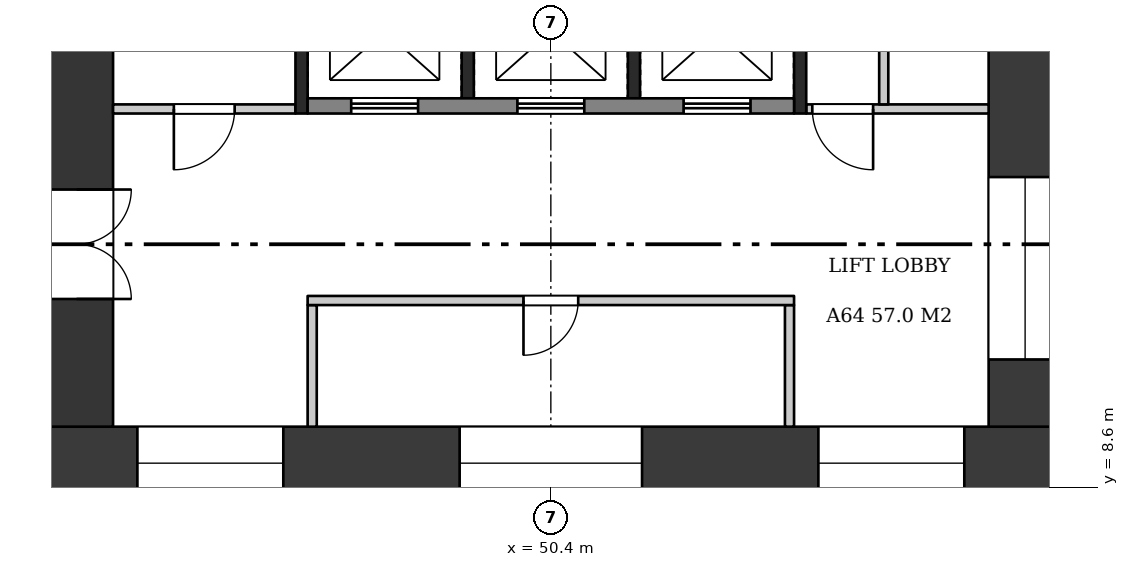
"""IFC4 building model, lengths in metres.
Left out: names, types, materials, properties, quantities, classifications, styles, units other than length and angle.
Written with IfcOpenShell. Run it as: python <this file> out.ifc"""

import sys

from ifc_helpers import new_model, si_unit, direction, frame, frame_2d, origin, place, context, subcontext, project, spatial, rectangle, extrude, element, fill, save


model = new_model("IFC4")
c1 = context("Model", 3, precision=1e-05, world=origin(), true_north=direction((0.0, 1.0)))
c2 = subcontext(c1, "Body", "Model", "MODEL_VIEW")
j1 = project(units=[si_unit("LENGTHUNIT", "METRE"), si_unit("PLANEANGLEUNIT", "RADIAN")], contexts=[c1])
p1 = place(None, origin())
s1 = spatial("IfcSite", under=j1, at=p1, CompositionType="ELEMENT")
p2 = place(p1, origin())
s2 = spatial("IfcBuilding", under=s1, at=p2, CompositionType="ELEMENT")
p3 = place(p2, frame((0.0, 0.0, 245.7)))
s3 = spatial("IfcBuildingStorey", under=s2, at=p3, CompositionType="ELEMENT", Elevation=245.7)
p4 = place(p3, frame((42.0, 9.0, 0.0), z_axis=(0.0, 0.0, 1.0), x_axis=(1.0, 0.0, 0.0)))
e1 = element("IfcWall", 1, at=p4, inside=s3, PredefinedType="SHEAR", context=c2, shape_type="SweptSolid", body=[
    extrude(rectangle(XDim=16.8, YDim=1.2, at=frame_2d((8.4, 0.0))), origin(), (0.0, 0.0, 1.0), 3.22),
])
p5 = place(p4, frame((1.6, 0.0, 0.6)))
e2 = element("IfcOpeningElement", 2, at=p5, cuts=e1, PredefinedType="OPENING", context=c2, shape_type="SweptSolid", body=[
    extrude(rectangle(XDim=2.4, YDim=2.1, at=frame_2d((1.2, 1.05))), frame((0.0, 0.61, 0.0), z_axis=(0.0, -1.0, 0.0), x_axis=(1.0, 0.0, 0.0)), (0.0, 0.0, 1.0), 1.22),
])
p6 = place(p4, frame((6.9, 0.0, 1.6)))
e3 = element("IfcOpeningElement", 3, at=p6, cuts=e1, PredefinedType="OPENING", context=c2, shape_type="SweptSolid", body=[
    extrude(rectangle(XDim=3.0, YDim=1.2, at=frame_2d((1.5, 0.6))), frame((0.0, 0.61, 0.0), z_axis=(0.0, -1.0, 0.0), x_axis=(1.0, 0.0, 0.0)), (0.0, 0.0, 1.0), 1.22),
])
p7 = place(p4, frame((12.8, 0.0, 0.6)))
e4 = element("IfcOpeningElement", 4, at=p7, cuts=e1, PredefinedType="OPENING", context=c2, shape_type="SweptSolid", body=[
    extrude(rectangle(XDim=2.4, YDim=2.1, at=frame_2d((1.2, 1.05))), frame((0.0, 0.61, 0.0), z_axis=(0.0, -1.0, 0.0), x_axis=(1.0, 0.0, 0.0)), (0.0, 0.0, 1.0), 1.22),
])
p8 = place(p3, frame((42.6, 9.6, 0.0), z_axis=(0.0, 0.0, 1.0), x_axis=(0.0, 1.0, 0.0)))
e5 = element("IfcWall", 5, at=p8, inside=s3, PredefinedType="SHEAR", context=c2, shape_type="SweptSolid", body=[
    extrude(rectangle(XDim=14.4, YDim=1.2, at=frame_2d((7.2, 0.0))), origin(), (0.0, 0.0, 1.0), 3.22),
])
p9 = place(p8, frame((2.1, 0.0, 0.0)))
e6 = element("IfcOpeningElement", 6, at=p9, cuts=e5, PredefinedType="OPENING", context=c2, shape_type="SweptSolid", body=[
    extrude(rectangle(XDim=1.8, YDim=2.1, at=frame_2d((0.9, 1.05))), frame((0.0, 0.61, 0.0), z_axis=(0.0, -1.0, 0.0), x_axis=(1.0, 0.0, 0.0)), (0.0, 0.0, 1.0), 1.22),
])
p10 = place(p3, frame((58.2, 9.6, 0.0), z_axis=(0.0, 0.0, 1.0), x_axis=(0.0, 1.0, 0.0)))
e7 = element("IfcWall", 7, at=p10, inside=s3, PredefinedType="SHEAR", context=c2, shape_type="SweptSolid", body=[
    extrude(rectangle(XDim=14.4, YDim=1.2, at=frame_2d((7.2, 0.0))), origin(), (0.0, 0.0, 1.0), 3.22),
])
p11 = place(p10, frame((1.105, 0.0, 0.6)))
e8 = element("IfcOpeningElement", 8, at=p11, cuts=e7, PredefinedType="OPENING", context=c2, shape_type="SweptSolid", body=[
    extrude(rectangle(XDim=3.0, YDim=2.1, at=frame_2d((1.5, 1.05))), frame((0.0, 0.61, 0.0), z_axis=(0.0, -1.0, 0.0), x_axis=(1.0, 0.0, 0.0)), (0.0, 0.0, 1.0), 1.22),
])
p12 = place(p10, frame((8.32, 0.0, 1.6)))
e9 = element("IfcOpeningElement", 9, at=p12, cuts=e7, PredefinedType="OPENING", context=c2, shape_type="SweptSolid", body=[
    extrude(rectangle(XDim=3.0, YDim=1.2, at=frame_2d((1.5, 0.6))), frame((0.0, 0.61, 0.0), z_axis=(0.0, -1.0, 0.0), x_axis=(1.0, 0.0, 0.0)), (0.0, 0.0, 1.0), 1.22),
])
for number, where, z_axis, x_axis in (
    (10, (46.475, 9.6, 0.0), (0.0, 0.0, 1.0), (0.0, 1.0, 0.0)),
    (11, (54.325, 9.6, 0.0), (0.0, 0.0, 1.0), (0.0, 1.0, 0.0)),
):
    element("IfcWall", number, at=place(p3, frame(where, z_axis=z_axis, x_axis=x_axis)), inside=s3, PredefinedType="PARTITIONING", context=c2, shape_type="SweptSolid", body=[
        extrude(rectangle(XDim=2.0, YDim=0.15, at=frame_2d((1.0, 0.0))), origin(), (0.0, 0.0, 1.0), 3.22),
    ])
p13 = place(p3, frame((46.4, 11.675, 0.0), z_axis=(0.0, 0.0, 1.0), x_axis=(1.0, 0.0, 0.0)))
e12 = element("IfcWall", 12, at=p13, inside=s3, PredefinedType="PARTITIONING", context=c2, shape_type="SweptSolid", body=[
    extrude(rectangle(XDim=8.0, YDim=0.15, at=frame_2d((4.0, 0.0))), origin(), (0.0, 0.0, 1.0), 3.22),
])
p14 = place(p13, frame((3.55, 0.0, 0.0)))
e13 = element("IfcOpeningElement", 13, at=p14, cuts=e12, PredefinedType="OPENING", context=c2, shape_type="SweptSolid", body=[
    extrude(rectangle(XDim=0.9, YDim=2.1, at=frame_2d((0.45, 1.05))), frame((0.0, 0.085, 0.0), z_axis=(0.0, -1.0, 0.0), x_axis=(1.0, 0.0, 0.0)), (0.0, 0.0, 1.0), 0.17),
])
for number, where, z_axis, x_axis in (
    (14, (49.033, 15.0, 0.0), (0.0, 0.0, 1.0), (0.0, 1.0, 0.0)),
    (15, (51.767, 15.0, 0.0), (0.0, 0.0, 1.0), (0.0, 1.0, 0.0)),
):
    element("IfcWall", number, at=place(p3, frame(where, z_axis=z_axis, x_axis=x_axis)), inside=s3, PredefinedType="SHEAR", context=c2, shape_type="SweptSolid", body=[
        extrude(rectangle(XDim=1.9, YDim=0.2, at=frame_2d((0.95, 0.0))), origin(), (0.0, 0.0, 1.0), 3.22),
    ])
p15 = place(p3, frame((46.4, 14.875, 0.0), z_axis=(0.0, 0.0, 1.0), x_axis=(1.0, 0.0, 0.0)))
e16 = element("IfcWall", 16, at=p15, inside=s3, PredefinedType="SHEAR", context=c2, shape_type="SweptSolid", body=[
    extrude(rectangle(XDim=8.0, YDim=0.25, at=frame_2d((4.0, 0.0))), origin(), (0.0, 0.0, 1.0), 3.22),
])
p16 = place(p15, frame((0.717, 0.0, 0.0)))
e17 = element("IfcOpeningElement", 17, at=p16, cuts=e16, PredefinedType="OPENING", context=c2, shape_type="SweptSolid", body=[
    extrude(rectangle(XDim=1.1, YDim=2.1, at=frame_2d((0.55, 1.05))), frame((0.0, 0.135, 0.0), z_axis=(0.0, -1.0, 0.0), x_axis=(1.0, 0.0, 0.0)), (0.0, 0.0, 1.0), 0.27),
])
p17 = place(p15, frame((3.45, 0.0, 0.0)))
e18 = element("IfcOpeningElement", 18, at=p17, cuts=e16, PredefinedType="OPENING", context=c2, shape_type="SweptSolid", body=[
    extrude(rectangle(XDim=1.1, YDim=2.1, at=frame_2d((0.55, 1.05))), frame((0.0, 0.135, 0.0), z_axis=(0.0, -1.0, 0.0), x_axis=(1.0, 0.0, 0.0)), (0.0, 0.0, 1.0), 0.27),
])
p18 = place(p15, frame((6.183, 0.0, 0.0)))
e19 = element("IfcOpeningElement", 19, at=p18, cuts=e16, PredefinedType="OPENING", context=c2, shape_type="SweptSolid", body=[
    extrude(rectangle(XDim=1.1, YDim=2.1, at=frame_2d((0.55, 1.05))), frame((0.0, 0.135, 0.0), z_axis=(0.0, -1.0, 0.0), x_axis=(1.0, 0.0, 0.0)), (0.0, 0.0, 1.0), 0.27),
])
p19 = place(p3, frame((46.3, 14.75, 0.0), z_axis=(0.0, 0.0, 1.0), x_axis=(0.0, 1.0, 0.0)))
e20 = element("IfcWall", 20, at=p19, inside=s3, PredefinedType="SHEAR", context=c2, shape_type="SweptSolid", body=[
    extrude(rectangle(XDim=2.4, YDim=0.2, at=frame_2d((1.2, 0.0))), origin(), (0.0, 0.0, 1.0), 3.22),
])
p20 = place(p3, frame((43.2, 14.825, 0.0), z_axis=(0.0, 0.0, 1.0), x_axis=(1.0, 0.0, 0.0)))
e21 = element("IfcWall", 21, at=p20, inside=s3, PredefinedType="PARTITIONING", context=c2, shape_type="SweptSolid", body=[
    extrude(rectangle(XDim=3.0, YDim=0.15, at=frame_2d((1.5, 0.0))), origin(), (0.0, 0.0, 1.0), 3.22),
])
p21 = place(p20, frame((1.0, 0.0, 0.0)))
e22 = element("IfcOpeningElement", 22, at=p21, cuts=e21, PredefinedType="OPENING", context=c2, shape_type="SweptSolid", body=[
    extrude(rectangle(XDim=1.0, YDim=2.1, at=frame_2d((0.5, 1.05))), frame((0.0, 0.085, 0.0), z_axis=(0.0, -1.0, 0.0), x_axis=(1.0, 0.0, 0.0)), (0.0, 0.0, 1.0), 0.17),
])
p22 = place(p3, frame((54.5, 14.75, 0.0), z_axis=(0.0, 0.0, 1.0), x_axis=(0.0, 1.0, 0.0)))
e23 = element("IfcWall", 23, at=p22, inside=s3, PredefinedType="SHEAR", context=c2, shape_type="SweptSolid", body=[
    extrude(rectangle(XDim=9.25, YDim=0.2, at=frame_2d((4.625, 0.0))), origin(), (0.0, 0.0, 1.0), 3.22),
])
p23 = place(p3, frame((54.6, 14.825, 0.0), z_axis=(0.0, 0.0, 1.0), x_axis=(1.0, 0.0, 0.0)))
e24 = element("IfcWall", 24, at=p23, inside=s3, PredefinedType="PARTITIONING", context=c2, shape_type="SweptSolid", body=[
    extrude(rectangle(XDim=3.0, YDim=0.15, at=frame_2d((1.5, 0.0))), origin(), (0.0, 0.0, 1.0), 3.22),
])
p24 = place(p23, frame((0.1, 0.0, 0.0)))
e25 = element("IfcOpeningElement", 25, at=p24, cuts=e24, PredefinedType="OPENING", context=c2, shape_type="SweptSolid", body=[
    extrude(rectangle(XDim=1.0, YDim=2.1, at=frame_2d((0.5, 1.05))), frame((0.0, 0.085, 0.0), z_axis=(0.0, -1.0, 0.0), x_axis=(1.0, 0.0, 0.0)), (0.0, 0.0, 1.0), 0.17),
])
p25 = place(p3, frame((55.875, 14.9, 0.0), z_axis=(0.0, 0.0, 1.0), x_axis=(0.0, 1.0, 0.0)))
e26 = element("IfcWall", 26, at=p25, inside=s3, PredefinedType="PARTITIONING", context=c2, shape_type="SweptSolid", body=[
    extrude(rectangle(XDim=9.1, YDim=0.15, at=frame_2d((4.55, 0.0))), origin(), (0.0, 0.0, 1.0), 3.22),
])
p26 = place(p25, frame((4.1, 0.0, 0.0)))
e27 = element("IfcOpeningElement", 27, at=p26, cuts=e26, PredefinedType="OPENING", context=c2, shape_type="SweptSolid", body=[
    extrude(rectangle(XDim=0.9, YDim=2.1, at=frame_2d((0.45, 1.05))), frame((0.0, 0.085, 0.0), z_axis=(0.0, -1.0, 0.0), x_axis=(1.0, 0.0, 0.0)), (0.0, 0.0, 1.0), 0.17),
])
p27 = place(p9, frame((1.8, 0.0, 0.0), z_axis=(0.0, 0.0, 1.0), x_axis=(-1.0, 0.0, 0.0)))
e28 = element("IfcDoor", 28, at=p27, inside=s3, OperationType="DOUBLE_DOOR_SINGLE_SWING", PredefinedType="DOOR", context=c2, shape_type="SweptSolid", body=[
    extrude(rectangle(XDim=1.8, YDim=2.1, at=frame_2d((0.9, 1.05))), frame((0.0, 0.025, 0.0), z_axis=(0.0, -1.0, 0.0), x_axis=(1.0, 0.0, 0.0)), (0.0, 0.0, 1.0), 0.05),
])
fill(e6, e28)
p28 = place(p14, frame((0.9, 0.0, 0.0), z_axis=(0.0, 0.0, 1.0), x_axis=(-1.0, 0.0, 0.0)))
e29 = element("IfcDoor", 29, at=p28, inside=s3, OperationType="SINGLE_SWING_RIGHT", PredefinedType="DOOR", context=c2, shape_type="SweptSolid", body=[
    extrude(rectangle(XDim=0.9, YDim=2.1, at=frame_2d((0.45, 1.05))), frame((0.0, 0.025, 0.0), z_axis=(0.0, -1.0, 0.0), x_axis=(1.0, 0.0, 0.0)), (0.0, 0.0, 1.0), 0.05),
])
fill(e13, e29)
p29 = place(p16, origin())
e30 = element("IfcDoor", 30, at=p29, inside=s3, OperationType="DOUBLE_DOOR_SLIDING", PredefinedType="DOOR", context=c2, shape_type="SweptSolid", body=[
    extrude(rectangle(XDim=1.1, YDim=2.1, at=frame_2d((0.55, 1.05))), frame((0.0, 0.025, 0.0), z_axis=(0.0, -1.0, 0.0), x_axis=(1.0, 0.0, 0.0)), (0.0, 0.0, 1.0), 0.05),
])
fill(e17, e30)
p30 = place(p17, origin())
e31 = element("IfcDoor", 31, at=p30, inside=s3, OperationType="DOUBLE_DOOR_SLIDING", PredefinedType="DOOR", context=c2, shape_type="SweptSolid", body=[
    extrude(rectangle(XDim=1.1, YDim=2.1, at=frame_2d((0.55, 1.05))), frame((0.0, 0.025, 0.0), z_axis=(0.0, -1.0, 0.0), x_axis=(1.0, 0.0, 0.0)), (0.0, 0.0, 1.0), 0.05),
])
fill(e18, e31)
p31 = place(p18, origin())
e32 = element("IfcDoor", 32, at=p31, inside=s3, OperationType="DOUBLE_DOOR_SLIDING", PredefinedType="DOOR", context=c2, shape_type="SweptSolid", body=[
    extrude(rectangle(XDim=1.1, YDim=2.1, at=frame_2d((0.55, 1.05))), frame((0.0, 0.025, 0.0), z_axis=(0.0, -1.0, 0.0), x_axis=(1.0, 0.0, 0.0)), (0.0, 0.0, 1.0), 0.05),
])
fill(e19, e32)
p32 = place(p21, frame((1.0, 0.0, 0.0), z_axis=(0.0, 0.0, 1.0), x_axis=(-1.0, 0.0, 0.0)))
e33 = element("IfcDoor", 33, at=p32, inside=s3, OperationType="SINGLE_SWING_RIGHT", PredefinedType="DOOR", context=c2, shape_type="SweptSolid", body=[
    extrude(rectangle(XDim=1.0, YDim=2.1, at=frame_2d((0.5, 1.05))), frame((0.0, 0.025, 0.0), z_axis=(0.0, -1.0, 0.0), x_axis=(1.0, 0.0, 0.0)), (0.0, 0.0, 1.0), 0.05),
])
fill(e22, e33)
p33 = place(p24, frame((1.0, 0.0, 0.0), z_axis=(0.0, 0.0, 1.0), x_axis=(-1.0, 0.0, 0.0)))
e34 = element("IfcDoor", 34, at=p33, inside=s3, OperationType="SINGLE_SWING_LEFT", PredefinedType="DOOR", context=c2, shape_type="SweptSolid", body=[
    extrude(rectangle(XDim=1.0, YDim=2.1, at=frame_2d((0.5, 1.05))), frame((0.0, 0.025, 0.0), z_axis=(0.0, -1.0, 0.0), x_axis=(1.0, 0.0, 0.0)), (0.0, 0.0, 1.0), 0.05),
])
fill(e25, e34)
p34 = place(p5, origin())
e35 = element("IfcWindow", 35, at=p34, inside=s3, PartitioningType="SINGLE_PANEL", PredefinedType="WINDOW", context=c2, shape_type="SweptSolid", body=[
    extrude(rectangle(XDim=2.4, YDim=2.1, at=frame_2d((1.2, 1.05))), frame((0.0, 0.03, 0.0), z_axis=(0.0, -1.0, 0.0), x_axis=(1.0, 0.0, 0.0)), (0.0, 0.0, 1.0), 0.06),
])
fill(e2, e35)
p35 = place(p6, origin())
e36 = element("IfcWindow", 36, at=p35, inside=s3, PartitioningType="SINGLE_PANEL", PredefinedType="WINDOW", context=c2, shape_type="SweptSolid", body=[
    extrude(rectangle(XDim=3.0, YDim=1.2, at=frame_2d((1.5, 0.6))), frame((0.0, 0.03, 0.0), z_axis=(0.0, -1.0, 0.0), x_axis=(1.0, 0.0, 0.0)), (0.0, 0.0, 1.0), 0.06),
])
fill(e3, e36)
p36 = place(p7, origin())
e37 = element("IfcWindow", 37, at=p36, inside=s3, PartitioningType="SINGLE_PANEL", PredefinedType="WINDOW", context=c2, shape_type="SweptSolid", body=[
    extrude(rectangle(XDim=2.4, YDim=2.1, at=frame_2d((1.2, 1.05))), frame((0.0, 0.03, 0.0), z_axis=(0.0, -1.0, 0.0), x_axis=(1.0, 0.0, 0.0)), (0.0, 0.0, 1.0), 0.06),
])
fill(e4, e37)
p37 = place(p11, origin())
e38 = element("IfcWindow", 38, at=p37, inside=s3, PartitioningType="SINGLE_PANEL", PredefinedType="WINDOW", context=c2, shape_type="SweptSolid", body=[
    extrude(rectangle(XDim=3.0, YDim=2.1, at=frame_2d((1.5, 1.05))), frame((0.0, 0.03, 0.0), z_axis=(0.0, -1.0, 0.0), x_axis=(1.0, 0.0, 0.0)), (0.0, 0.0, 1.0), 0.06),
])
fill(e8, e38)
save(model, sys.argv[1])
